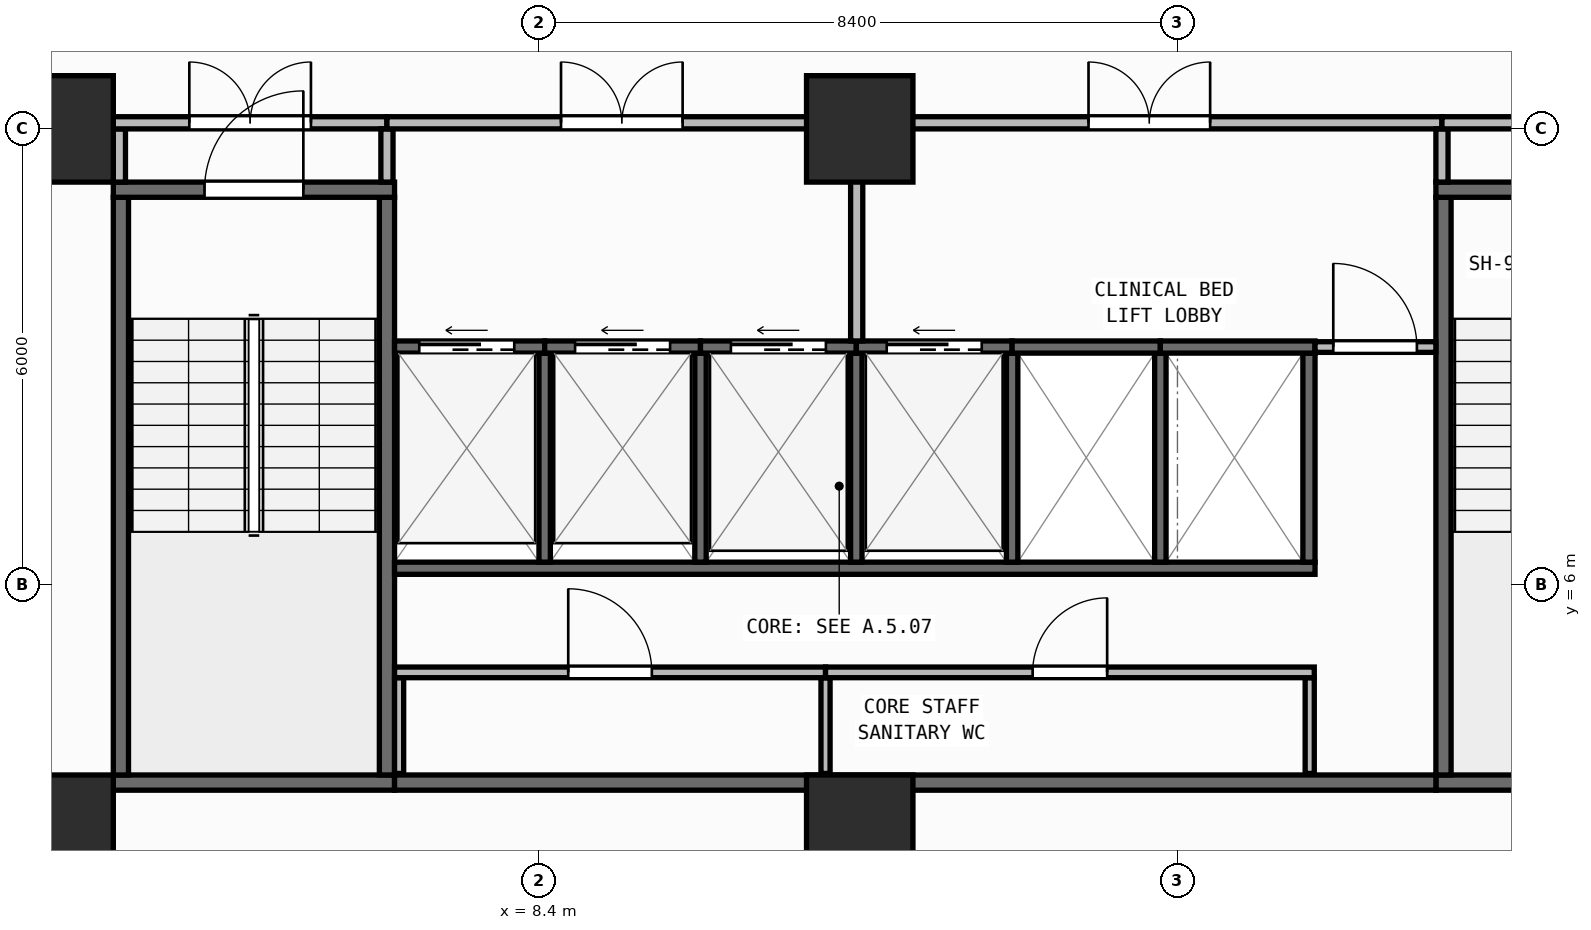
"""IFC4 building model, lengths in metres.
Left out: names, types, materials, properties, quantities, classifications, styles, units other than length and angle.
Written with IfcOpenShell. Run it as: python <this file> out.ifc"""

import sys

from ifc_helpers import new_model, si_unit, direction, frame, frame_2d, origin, origin_2d, place, context, subcontext, project, spatial, rectangle, extrude, element, fill, save


model = new_model("IFC4")
c1 = context("Model", 3, precision=1e-05, world=origin(), true_north=direction((0.0, 1.0)))
c2 = subcontext(c1, "Body", "Model", "MODEL_VIEW")
j1 = project(units=[si_unit("LENGTHUNIT", "METRE"), si_unit("PLANEANGLEUNIT", "RADIAN")], contexts=[c1])
p1 = place(None, origin())
s1 = spatial("IfcSite", under=j1, at=p1, CompositionType="ELEMENT")
p2 = place(p1, origin())
s2 = spatial("IfcBuilding", under=s1, at=p2, CompositionType="ELEMENT")
p3 = place(p2, frame((0.0, 0.0, 93.6)))
s3 = spatial("IfcBuildingStorey", under=s2, at=p3, CompositionType="ELEMENT", Elevation=93.6)
for number, where, z_axis, x_axis in (
    (1, (2.1, 2.8, 0.0), (0.0, 0.0, 1.0), (1.0, 0.0, 0.0)),
    (2, (12.62, 2.8, 0.0), (0.0, 0.0, 1.0), (1.0, 0.0, 0.0)),
    (3, (2.1, 12.0, 0.0), (0.0, 0.0, 1.0), (1.0, 0.0, 0.0)),
    (4, (12.62, 12.0, 0.0), (0.0, 0.0, 1.0), (1.0, 0.0, 0.0)),
):
    element("IfcColumn", number, at=place(p3, frame(where, z_axis=z_axis, x_axis=x_axis)), inside=s3, PredefinedType="COLUMN", context=c2, shape_type="SweptSolid", body=[
        extrude(rectangle(XDim=1.4, YDim=1.4, at=origin_2d()), origin(), (0.0, 0.0, 1.0), 3.95),
    ])
p4 = place(p3, frame((2.76, 0.174, 0.0), z_axis=(0.0, 0.0, 1.0), x_axis=(0.996571478456, 0.082736257641, 0.0)))
e5 = element("IfcWall", 5, at=p4, inside=s3, PredefinedType="STANDARD", context=c2, shape_type="SweptSolid", body=[
    extrude(rectangle(XDim=52.861, YDim=0.26, at=frame_2d((26.431, 0.0))), origin(), (0.0, 0.0, 1.0), 3.67),
])
p5 = place(p4, frame((25.231, 0.0, 0.9)))
e6 = element("IfcOpeningElement", 6, at=p5, cuts=e5, PredefinedType="OPENING", context=c2, shape_type="SweptSolid", body=[
    extrude(rectangle(XDim=2.4, YDim=1.65, at=frame_2d((1.2, 0.825))), frame((0.0, 0.14, 0.0), z_axis=(0.0, -1.0, 0.0), x_axis=(1.0, 0.0, 0.0)), (0.0, 0.0, 1.0), 0.28),
])
p6 = place(p3, frame((2.8, 3.4, 0.0), z_axis=(0.0, 0.0, 1.0), x_axis=(1.0, 0.0, 0.0)))
e7 = element("IfcWall", 7, at=p6, inside=s3, PredefinedType="SHEAR", context=c2, shape_type="SweptSolid", body=[
    extrude(rectangle(XDim=3.7, YDim=0.2, at=frame_2d((1.85, 0.0))), origin(), (0.0, 0.0, 1.0), 3.67),
])
for number, where, z_axis, x_axis in (
    (8, (2.9, 3.5, 0.0), (0.0, 0.0, 1.0), (0.0, 1.0, 0.0)),
    (9, (6.4, 3.5, 0.0), (0.0, 0.0, 1.0), (0.0, 1.0, 0.0)),
):
    element("IfcWall", number, at=place(p3, frame(where, z_axis=z_axis, x_axis=x_axis)), inside=s3, PredefinedType="SHEAR", context=c2, shape_type="SweptSolid", body=[
        extrude(rectangle(XDim=7.6, YDim=0.2, at=frame_2d((3.8, 0.0))), origin(), (0.0, 0.0, 1.0), 3.67),
    ])
p7 = place(p3, frame((2.8, 11.2, 0.0), z_axis=(0.0, 0.0, 1.0), x_axis=(1.0, 0.0, 0.0)))
e10 = element("IfcWall", 10, at=p7, inside=s3, PredefinedType="SHEAR", context=c2, shape_type="SweptSolid", body=[
    extrude(rectangle(XDim=3.7, YDim=0.2, at=frame_2d((1.85, 0.0))), origin(), (0.0, 0.0, 1.0), 3.67),
])
p8 = place(p7, frame((1.2, 0.0, 0.0)))
e11 = element("IfcOpeningElement", 11, at=p8, cuts=e10, PredefinedType="OPENING", context=c2, shape_type="SweptSolid", body=[
    extrude(rectangle(XDim=1.3, YDim=2.15, at=frame_2d((0.65, 1.075))), frame((0.0, 0.11, 0.0), z_axis=(0.0, -1.0, 0.0), x_axis=(1.0, 0.0, 0.0)), (0.0, 0.0, 1.0), 0.22),
])
p9 = place(p3, frame((20.2, 3.4, 0.0), z_axis=(0.0, 0.0, 1.0), x_axis=(1.0, 0.0, 0.0)))
e12 = element("IfcWall", 12, at=p9, inside=s3, PredefinedType="SHEAR", context=c2, shape_type="SweptSolid", body=[
    extrude(rectangle(XDim=3.7, YDim=0.2, at=frame_2d((1.85, 0.0))), origin(), (0.0, 0.0, 1.0), 3.67),
])
p10 = place(p3, frame((20.3, 3.5, 0.0), z_axis=(0.0, 0.0, 1.0), x_axis=(0.0, 1.0, 0.0)))
e13 = element("IfcWall", 13, at=p10, inside=s3, PredefinedType="SHEAR", context=c2, shape_type="SweptSolid", body=[
    extrude(rectangle(XDim=7.6, YDim=0.2, at=frame_2d((3.8, 0.0))), origin(), (0.0, 0.0, 1.0), 3.67),
])
p11 = place(p3, frame((20.2, 11.2, 0.0), z_axis=(0.0, 0.0, 1.0), x_axis=(1.0, 0.0, 0.0)))
e14 = element("IfcWall", 14, at=p11, inside=s3, PredefinedType="SHEAR", context=c2, shape_type="SweptSolid", body=[
    extrude(rectangle(XDim=3.7, YDim=0.2, at=frame_2d((1.85, 0.0))), origin(), (0.0, 0.0, 1.0), 3.67),
])
p12 = place(p11, frame((1.2, 0.0, 0.0)))
e15 = element("IfcOpeningElement", 15, at=p12, cuts=e14, PredefinedType="OPENING", context=c2, shape_type="SweptSolid", body=[
    extrude(rectangle(XDim=1.3, YDim=2.15, at=frame_2d((0.65, 1.075))), frame((0.0, 0.11, 0.0), z_axis=(0.0, -1.0, 0.0), x_axis=(1.0, 0.0, 0.0)), (0.0, 0.0, 1.0), 0.22),
])
p13 = place(p3, frame((6.5, 3.4, 0.0), z_axis=(0.0, 0.0, 1.0), x_axis=(1.0, 0.0, 0.0)))
e16 = element("IfcWall", 16, at=p13, inside=s3, PredefinedType="SHEAR", context=c2, shape_type="SweptSolid", body=[
    extrude(rectangle(XDim=13.7, YDim=0.2, at=frame_2d((6.85, 0.0))), origin(), (0.0, 0.0, 1.0), 3.67),
])
p14 = place(p3, frame((6.5, 6.22, 0.0), z_axis=(0.0, 0.0, 1.0), x_axis=(1.0, 0.0, 0.0)))
e17 = element("IfcWall", 17, at=p14, inside=s3, PredefinedType="SHEAR", context=c2, shape_type="SweptSolid", body=[
    extrude(rectangle(XDim=12.11, YDim=0.16, at=frame_2d((6.055, 0.0))), origin(), (0.0, 0.0, 1.0), 3.67),
])
p15 = place(p3, frame((18.53, 6.3, 0.0), z_axis=(0.0, 0.0, 1.0), x_axis=(0.0, 1.0, 0.0)))
e18 = element("IfcWall", 18, at=p15, inside=s3, PredefinedType="SHEAR", context=c2, shape_type="SweptSolid", body=[
    extrude(rectangle(XDim=2.75, YDim=0.16, at=frame_2d((1.375, 0.0))), origin(), (0.0, 0.0, 1.0), 3.67),
])
for number, where, z_axis, x_axis in (
    (19, (8.475, 6.3, 0.0), (0.0, 0.0, 1.0), (0.0, 1.0, 0.0)),
    (20, (10.525, 6.3, 0.0), (0.0, 0.0, 1.0), (0.0, 1.0, 0.0)),
    (21, (12.575, 6.3, 0.0), (0.0, 0.0, 1.0), (0.0, 1.0, 0.0)),
    (22, (14.625, 6.3, 0.0), (0.0, 0.0, 1.0), (0.0, 1.0, 0.0)),
    (23, (16.575, 6.3, 0.0), (0.0, 0.0, 1.0), (0.0, 1.0, 0.0)),
):
    element("IfcWall", number, at=place(p3, frame(where, z_axis=z_axis, x_axis=x_axis)), inside=s3, PredefinedType="SHEAR", context=c2, shape_type="SweptSolid", body=[
        extrude(rectangle(XDim=2.75, YDim=0.15, at=frame_2d((1.375, 0.0))), origin(), (0.0, 0.0, 1.0), 3.67),
    ])
p16 = place(p3, frame((6.5, 9.13, 0.0), z_axis=(0.0, 0.0, 1.0), x_axis=(1.0, 0.0, 0.0)))
e24 = element("IfcWall", 24, at=p16, inside=s3, PredefinedType="SHEAR", context=c2, shape_type="SweptSolid", body=[
    extrude(rectangle(XDim=1.975, YDim=0.16, at=frame_2d((0.988, 0.0))), origin(), (0.0, 0.0, 1.0), 3.67),
])
p17 = place(p16, frame((0.325, 0.0, 0.0)))
e25 = element("IfcOpeningElement", 25, at=p17, cuts=e24, PredefinedType="OPENING", context=c2, shape_type="SweptSolid", body=[
    extrude(rectangle(XDim=1.25, YDim=2.15, at=frame_2d((0.625, 1.075))), frame((0.0, 0.09, 0.0), z_axis=(0.0, -1.0, 0.0), x_axis=(1.0, 0.0, 0.0)), (0.0, 0.0, 1.0), 0.18),
])
p18 = place(p3, frame((8.475, 9.13, 0.0), z_axis=(0.0, 0.0, 1.0), x_axis=(1.0, 0.0, 0.0)))
e26 = element("IfcWall", 26, at=p18, inside=s3, PredefinedType="SHEAR", context=c2, shape_type="SweptSolid", body=[
    extrude(rectangle(XDim=2.05, YDim=0.16, at=frame_2d((1.025, 0.0))), origin(), (0.0, 0.0, 1.0), 3.67),
])
p19 = place(p18, frame((0.4, 0.0, 0.0)))
e27 = element("IfcOpeningElement", 27, at=p19, cuts=e26, PredefinedType="OPENING", context=c2, shape_type="SweptSolid", body=[
    extrude(rectangle(XDim=1.25, YDim=2.15, at=frame_2d((0.625, 1.075))), frame((0.0, 0.09, 0.0), z_axis=(0.0, -1.0, 0.0), x_axis=(1.0, 0.0, 0.0)), (0.0, 0.0, 1.0), 0.18),
])
p20 = place(p3, frame((10.525, 9.13, 0.0), z_axis=(0.0, 0.0, 1.0), x_axis=(1.0, 0.0, 0.0)))
e28 = element("IfcWall", 28, at=p20, inside=s3, PredefinedType="SHEAR", context=c2, shape_type="SweptSolid", body=[
    extrude(rectangle(XDim=2.05, YDim=0.16, at=frame_2d((1.025, 0.0))), origin(), (0.0, 0.0, 1.0), 3.67),
])
p21 = place(p20, frame((0.4, 0.0, 0.0)))
e29 = element("IfcOpeningElement", 29, at=p21, cuts=e28, PredefinedType="OPENING", context=c2, shape_type="SweptSolid", body=[
    extrude(rectangle(XDim=1.25, YDim=2.15, at=frame_2d((0.625, 1.075))), frame((0.0, 0.09, 0.0), z_axis=(0.0, -1.0, 0.0), x_axis=(1.0, 0.0, 0.0)), (0.0, 0.0, 1.0), 0.18),
])
p22 = place(p3, frame((12.575, 9.13, 0.0), z_axis=(0.0, 0.0, 1.0), x_axis=(1.0, 0.0, 0.0)))
e30 = element("IfcWall", 30, at=p22, inside=s3, PredefinedType="SHEAR", context=c2, shape_type="SweptSolid", body=[
    extrude(rectangle(XDim=2.05, YDim=0.16, at=frame_2d((1.025, 0.0))), origin(), (0.0, 0.0, 1.0), 3.67),
])
p23 = place(p22, frame((0.4, 0.0, 0.0)))
e31 = element("IfcOpeningElement", 31, at=p23, cuts=e30, PredefinedType="OPENING", context=c2, shape_type="SweptSolid", body=[
    extrude(rectangle(XDim=1.25, YDim=2.15, at=frame_2d((0.625, 1.075))), frame((0.0, 0.09, 0.0), z_axis=(0.0, -1.0, 0.0), x_axis=(1.0, 0.0, 0.0)), (0.0, 0.0, 1.0), 0.18),
])
p24 = place(p3, frame((14.625, 9.13, 0.0), z_axis=(0.0, 0.0, 1.0), x_axis=(1.0, 0.0, 0.0)))
e32 = element("IfcWall", 32, at=p24, inside=s3, PredefinedType="SHEAR", context=c2, shape_type="SweptSolid", body=[
    extrude(rectangle(XDim=1.95, YDim=0.16, at=frame_2d((0.975, 0.0))), origin(), (0.0, 0.0, 1.0), 3.67),
])
p25 = place(p3, frame((16.575, 9.13, 0.0), z_axis=(0.0, 0.0, 1.0), x_axis=(1.0, 0.0, 0.0)))
e33 = element("IfcWall", 33, at=p25, inside=s3, PredefinedType="SHEAR", context=c2, shape_type="SweptSolid", body=[
    extrude(rectangle(XDim=2.035, YDim=0.16, at=frame_2d((1.018, 0.0))), origin(), (0.0, 0.0, 1.0), 3.67),
])
for number, where, z_axis, x_axis in (
    (34, (6.56, 3.52, 0.0), (0.0, 0.0, 1.0), (0.0, 1.0, 0.0)),
    (35, (12.17, 3.52, 0.0), (0.0, 0.0, 1.0), (0.0, 1.0, 0.0)),
    (36, (18.54, 3.52, 0.0), (0.0, 0.0, 1.0), (0.0, 1.0, 0.0)),
):
    element("IfcWall", number, at=place(p3, frame(where, z_axis=z_axis, x_axis=x_axis)), inside=s3, PredefinedType="PARTITIONING", context=c2, shape_type="SweptSolid", body=[
        extrude(rectangle(XDim=1.26, YDim=0.12, at=frame_2d((0.63, 0.0))), origin(), (0.0, 0.0, 1.0), 3.67),
    ])
p26 = place(p3, frame((6.5, 4.85, 0.0), z_axis=(0.0, 0.0, 1.0), x_axis=(1.0, 0.0, 0.0)))
e37 = element("IfcWall", 37, at=p26, inside=s3, PredefinedType="PARTITIONING", context=c2, shape_type="SweptSolid", body=[
    extrude(rectangle(XDim=5.67, YDim=0.14, at=frame_2d((2.835, 0.0))), origin(), (0.0, 0.0, 1.0), 3.67),
])
p27 = place(p26, frame((2.285, 0.0, 0.0)))
e38 = element("IfcOpeningElement", 38, at=p27, cuts=e37, PredefinedType="OPENING", context=c2, shape_type="SweptSolid", body=[
    extrude(rectangle(XDim=1.1, YDim=2.1, at=frame_2d((0.55, 1.05))), frame((0.0, 0.08, 0.0), z_axis=(0.0, -1.0, 0.0), x_axis=(1.0, 0.0, 0.0)), (0.0, 0.0, 1.0), 0.16),
])
p28 = place(p3, frame((12.17, 4.85, 0.0), z_axis=(0.0, 0.0, 1.0), x_axis=(1.0, 0.0, 0.0)))
e39 = element("IfcWall", 39, at=p28, inside=s3, PredefinedType="PARTITIONING", context=c2, shape_type="SweptSolid", body=[
    extrude(rectangle(XDim=6.43, YDim=0.14, at=frame_2d((3.215, 0.0))), origin(), (0.0, 0.0, 1.0), 3.67),
])
p29 = place(p28, frame((2.725, 0.0, 0.0)))
e40 = element("IfcOpeningElement", 40, at=p29, cuts=e39, PredefinedType="OPENING", context=c2, shape_type="SweptSolid", body=[
    extrude(rectangle(XDim=0.98, YDim=2.1, at=frame_2d((0.49, 1.05))), frame((0.0, 0.08, 0.0), z_axis=(0.0, -1.0, 0.0), x_axis=(1.0, 0.0, 0.0)), (0.0, 0.0, 1.0), 0.16),
])
p30 = place(p3, frame((18.61, 9.13, 0.0), z_axis=(0.0, 0.0, 1.0), x_axis=(1.0, 0.0, 0.0)))
e41 = element("IfcWall", 41, at=p30, inside=s3, PredefinedType="PARTITIONING", context=c2, shape_type="SweptSolid", body=[
    extrude(rectangle(XDim=1.59, YDim=0.14, at=frame_2d((0.795, 0.0))), origin(), (0.0, 0.0, 1.0), 3.67),
])
p31 = place(p30, frame((0.24, 0.0, 0.0)))
e42 = element("IfcOpeningElement", 42, at=p31, cuts=e41, PredefinedType="OPENING", context=c2, shape_type="SweptSolid", body=[
    extrude(rectangle(XDim=1.1, YDim=2.1, at=frame_2d((0.55, 1.05))), frame((0.0, 0.08, 0.0), z_axis=(0.0, -1.0, 0.0), x_axis=(1.0, 0.0, 0.0)), (0.0, 0.0, 1.0), 0.16),
])
p32 = place(p3, frame((2.88, 11.3, 0.0), z_axis=(0.0, 0.0, 1.0), x_axis=(0.0, 1.0, 0.0)))
e43 = element("IfcWall", 43, at=p32, inside=s3, PredefinedType="PARTITIONING", context=c2, shape_type="SweptSolid", body=[
    extrude(rectangle(XDim=0.7, YDim=0.16, at=frame_2d((0.35, 0.0))), origin(), (0.0, 0.0, 1.0), 3.67),
])
p33 = place(p3, frame((2.8, 12.08, 0.0), z_axis=(0.0, 0.0, 1.0), x_axis=(1.0, 0.0, 0.0)))
e44 = element("IfcWall", 44, at=p33, inside=s3, PredefinedType="PARTITIONING", context=c2, shape_type="SweptSolid", body=[
    extrude(rectangle(XDim=3.6, YDim=0.16, at=frame_2d((1.8, 0.0))), origin(), (0.0, 0.0, 1.0), 3.033),
])
p34 = place(p33, frame((1.0, 0.0, 0.0)))
e45 = element("IfcOpeningElement", 45, at=p34, cuts=e44, PredefinedType="OPENING", context=c2, shape_type="SweptSolid", body=[
    extrude(rectangle(XDim=1.6, YDim=2.05, at=frame_2d((0.8, 1.025))), frame((0.0, 0.09, 0.0), z_axis=(0.0, -1.0, 0.0), x_axis=(1.0, 0.0, 0.0)), (0.0, 0.0, 1.0), 0.18),
])
p35 = place(p3, frame((6.4, 11.3, 0.0), z_axis=(0.0, 0.0, 1.0), x_axis=(0.0, 1.0, 0.0)))
e46 = element("IfcWall", 46, at=p35, inside=s3, PredefinedType="PARTITIONING", context=c2, shape_type="SweptSolid", body=[
    extrude(rectangle(XDim=0.7, YDim=0.16, at=frame_2d((0.35, 0.0))), origin(), (0.0, 0.0, 1.0), 3.67),
])
p36 = place(p3, frame((6.4, 12.08, 0.0), z_axis=(0.0, 0.0, 1.0), x_axis=(1.0, 0.0, 0.0)))
e47 = element("IfcWall", 47, at=p36, inside=s3, PredefinedType="PARTITIONING", context=c2, shape_type="SweptSolid", body=[
    extrude(rectangle(XDim=6.18, YDim=0.16, at=frame_2d((3.09, 0.0))), origin(), (0.0, 0.0, 1.0), 3.033),
])
p37 = place(p36, frame((2.29, 0.0, 0.0)))
e48 = element("IfcOpeningElement", 48, at=p37, cuts=e47, PredefinedType="OPENING", context=c2, shape_type="SweptSolid", body=[
    extrude(rectangle(XDim=1.6, YDim=2.05, at=frame_2d((0.8, 1.025))), frame((0.0, 0.09, 0.0), z_axis=(0.0, -1.0, 0.0), x_axis=(1.0, 0.0, 0.0)), (0.0, 0.0, 1.0), 0.18),
])
p38 = place(p3, frame((12.58, 9.21, 0.0), z_axis=(0.0, 0.0, 1.0), x_axis=(0.0, 1.0, 0.0)))
e49 = element("IfcWall", 49, at=p38, inside=s3, PredefinedType="PARTITIONING", context=c2, shape_type="SweptSolid", body=[
    extrude(rectangle(XDim=2.79, YDim=0.16, at=frame_2d((1.395, 0.0))), origin(), (0.0, 0.0, 1.0), 3.67),
])
p39 = place(p3, frame((12.58, 12.08, 0.0), z_axis=(0.0, 0.0, 1.0), x_axis=(1.0, 0.0, 0.0)))
e50 = element("IfcWall", 50, at=p39, inside=s3, PredefinedType="PARTITIONING", context=c2, shape_type="SweptSolid", body=[
    extrude(rectangle(XDim=7.7, YDim=0.16, at=frame_2d((3.85, 0.0))), origin(), (0.0, 0.0, 1.0), 3.033),
])
p40 = place(p39, frame((3.05, 0.0, 0.0)))
e51 = element("IfcOpeningElement", 51, at=p40, cuts=e50, PredefinedType="OPENING", context=c2, shape_type="SweptSolid", body=[
    extrude(rectangle(XDim=1.6, YDim=2.05, at=frame_2d((0.8, 1.025))), frame((0.0, 0.09, 0.0), z_axis=(0.0, -1.0, 0.0), x_axis=(1.0, 0.0, 0.0)), (0.0, 0.0, 1.0), 0.18),
])
p41 = place(p3, frame((20.28, 11.3, 0.0), z_axis=(0.0, 0.0, 1.0), x_axis=(0.0, 1.0, 0.0)))
e52 = element("IfcWall", 52, at=p41, inside=s3, PredefinedType="PARTITIONING", context=c2, shape_type="SweptSolid", body=[
    extrude(rectangle(XDim=0.7, YDim=0.16, at=frame_2d((0.35, 0.0))), origin(), (0.0, 0.0, 1.0), 3.67),
])
p42 = place(p3, frame((20.28, 12.08, 0.0), z_axis=(0.0, 0.0, 1.0), x_axis=(1.0, 0.0, 0.0)))
e53 = element("IfcWall", 53, at=p42, inside=s3, PredefinedType="PARTITIONING", context=c2, shape_type="SweptSolid", body=[
    extrude(rectangle(XDim=3.62, YDim=0.16, at=frame_2d((1.81, 0.0))), origin(), (0.0, 0.0, 1.0), 3.033),
])
p43 = place(p42, frame((1.01, 0.0, 0.0)))
e54 = element("IfcOpeningElement", 54, at=p43, cuts=e53, PredefinedType="OPENING", context=c2, shape_type="SweptSolid", body=[
    extrude(rectangle(XDim=1.6, YDim=2.05, at=frame_2d((0.8, 1.025))), frame((0.0, 0.09, 0.0), z_axis=(0.0, -1.0, 0.0), x_axis=(1.0, 0.0, 0.0)), (0.0, 0.0, 1.0), 0.18),
])
p44 = place(p8, origin())
e55 = element("IfcDoor", 55, at=p44, inside=s3, OperationType="SINGLE_SWING_RIGHT", PredefinedType="DOOR", context=c2, shape_type="SweptSolid", body=[
    extrude(rectangle(XDim=1.3, YDim=2.15, at=frame_2d((0.65, 1.075))), frame((0.0, 0.025, 0.0), z_axis=(0.0, -1.0, 0.0), x_axis=(1.0, 0.0, 0.0)), (0.0, 0.0, 1.0), 0.05),
])
fill(e11, e55)
p45 = place(p17, origin())
e56 = element("IfcDoor", 56, at=p45, inside=s3, OperationType="SLIDING_TO_LEFT", PredefinedType="DOOR", context=c2, shape_type="SweptSolid", body=[
    extrude(rectangle(XDim=1.25, YDim=2.15, at=frame_2d((0.625, 1.075))), frame((0.0, 0.025, 0.0), z_axis=(0.0, -1.0, 0.0), x_axis=(1.0, 0.0, 0.0)), (0.0, 0.0, 1.0), 0.05),
])
fill(e25, e56)
p46 = place(p19, origin())
e57 = element("IfcDoor", 57, at=p46, inside=s3, OperationType="SLIDING_TO_LEFT", PredefinedType="DOOR", context=c2, shape_type="SweptSolid", body=[
    extrude(rectangle(XDim=1.25, YDim=2.15, at=frame_2d((0.625, 1.075))), frame((0.0, 0.025, 0.0), z_axis=(0.0, -1.0, 0.0), x_axis=(1.0, 0.0, 0.0)), (0.0, 0.0, 1.0), 0.05),
])
fill(e27, e57)
p47 = place(p21, origin())
e58 = element("IfcDoor", 58, at=p47, inside=s3, OperationType="SLIDING_TO_LEFT", PredefinedType="DOOR", context=c2, shape_type="SweptSolid", body=[
    extrude(rectangle(XDim=1.25, YDim=2.15, at=frame_2d((0.625, 1.075))), frame((0.0, 0.025, 0.0), z_axis=(0.0, -1.0, 0.0), x_axis=(1.0, 0.0, 0.0)), (0.0, 0.0, 1.0), 0.05),
])
fill(e29, e58)
p48 = place(p23, origin())
e59 = element("IfcDoor", 59, at=p48, inside=s3, OperationType="SLIDING_TO_LEFT", PredefinedType="DOOR", context=c2, shape_type="SweptSolid", body=[
    extrude(rectangle(XDim=1.25, YDim=2.15, at=frame_2d((0.625, 1.075))), frame((0.0, 0.025, 0.0), z_axis=(0.0, -1.0, 0.0), x_axis=(1.0, 0.0, 0.0)), (0.0, 0.0, 1.0), 0.05),
])
fill(e31, e59)
p49 = place(p27, origin())
e60 = element("IfcDoor", 60, at=p49, inside=s3, OperationType="SINGLE_SWING_LEFT", PredefinedType="DOOR", context=c2, shape_type="SweptSolid", body=[
    extrude(rectangle(XDim=1.1, YDim=2.1, at=frame_2d((0.55, 1.05))), frame((0.0, 0.025, 0.0), z_axis=(0.0, -1.0, 0.0), x_axis=(1.0, 0.0, 0.0)), (0.0, 0.0, 1.0), 0.05),
])
fill(e38, e60)
p50 = place(p29, origin())
e61 = element("IfcDoor", 61, at=p50, inside=s3, OperationType="SINGLE_SWING_RIGHT", PredefinedType="DOOR", context=c2, shape_type="SweptSolid", body=[
    extrude(rectangle(XDim=0.98, YDim=2.1, at=frame_2d((0.49, 1.05))), frame((0.0, 0.025, 0.0), z_axis=(0.0, -1.0, 0.0), x_axis=(1.0, 0.0, 0.0)), (0.0, 0.0, 1.0), 0.05),
])
fill(e40, e61)
p51 = place(p31, origin())
e62 = element("IfcDoor", 62, at=p51, inside=s3, OperationType="SINGLE_SWING_LEFT", PredefinedType="DOOR", context=c2, shape_type="SweptSolid", body=[
    extrude(rectangle(XDim=1.1, YDim=2.1, at=frame_2d((0.55, 1.05))), frame((0.0, 0.025, 0.0), z_axis=(0.0, -1.0, 0.0), x_axis=(1.0, 0.0, 0.0)), (0.0, 0.0, 1.0), 0.05),
])
fill(e42, e62)
p52 = place(p34, origin())
e63 = element("IfcDoor", 63, at=p52, inside=s3, OperationType="DOUBLE_DOOR_SINGLE_SWING", PredefinedType="DOOR", context=c2, shape_type="SweptSolid", body=[
    extrude(rectangle(XDim=1.6, YDim=2.05, at=frame_2d((0.8, 1.025))), frame((0.0, 0.025, 0.0), z_axis=(0.0, -1.0, 0.0), x_axis=(1.0, 0.0, 0.0)), (0.0, 0.0, 1.0), 0.05),
])
fill(e45, e63)
p53 = place(p37, origin())
e64 = element("IfcDoor", 64, at=p53, inside=s3, OperationType="DOUBLE_DOOR_SINGLE_SWING", PredefinedType="DOOR", context=c2, shape_type="SweptSolid", body=[
    extrude(rectangle(XDim=1.6, YDim=2.05, at=frame_2d((0.8, 1.025))), frame((0.0, 0.025, 0.0), z_axis=(0.0, -1.0, 0.0), x_axis=(1.0, 0.0, 0.0)), (0.0, 0.0, 1.0), 0.05),
])
fill(e48, e64)
p54 = place(p40, origin())
e65 = element("IfcDoor", 65, at=p54, inside=s3, OperationType="DOUBLE_DOOR_SINGLE_SWING", PredefinedType="DOOR", context=c2, shape_type="SweptSolid", body=[
    extrude(rectangle(XDim=1.6, YDim=2.05, at=frame_2d((0.8, 1.025))), frame((0.0, 0.025, 0.0), z_axis=(0.0, -1.0, 0.0), x_axis=(1.0, 0.0, 0.0)), (0.0, 0.0, 1.0), 0.05),
])
fill(e51, e65)
save(model, sys.argv[1])
